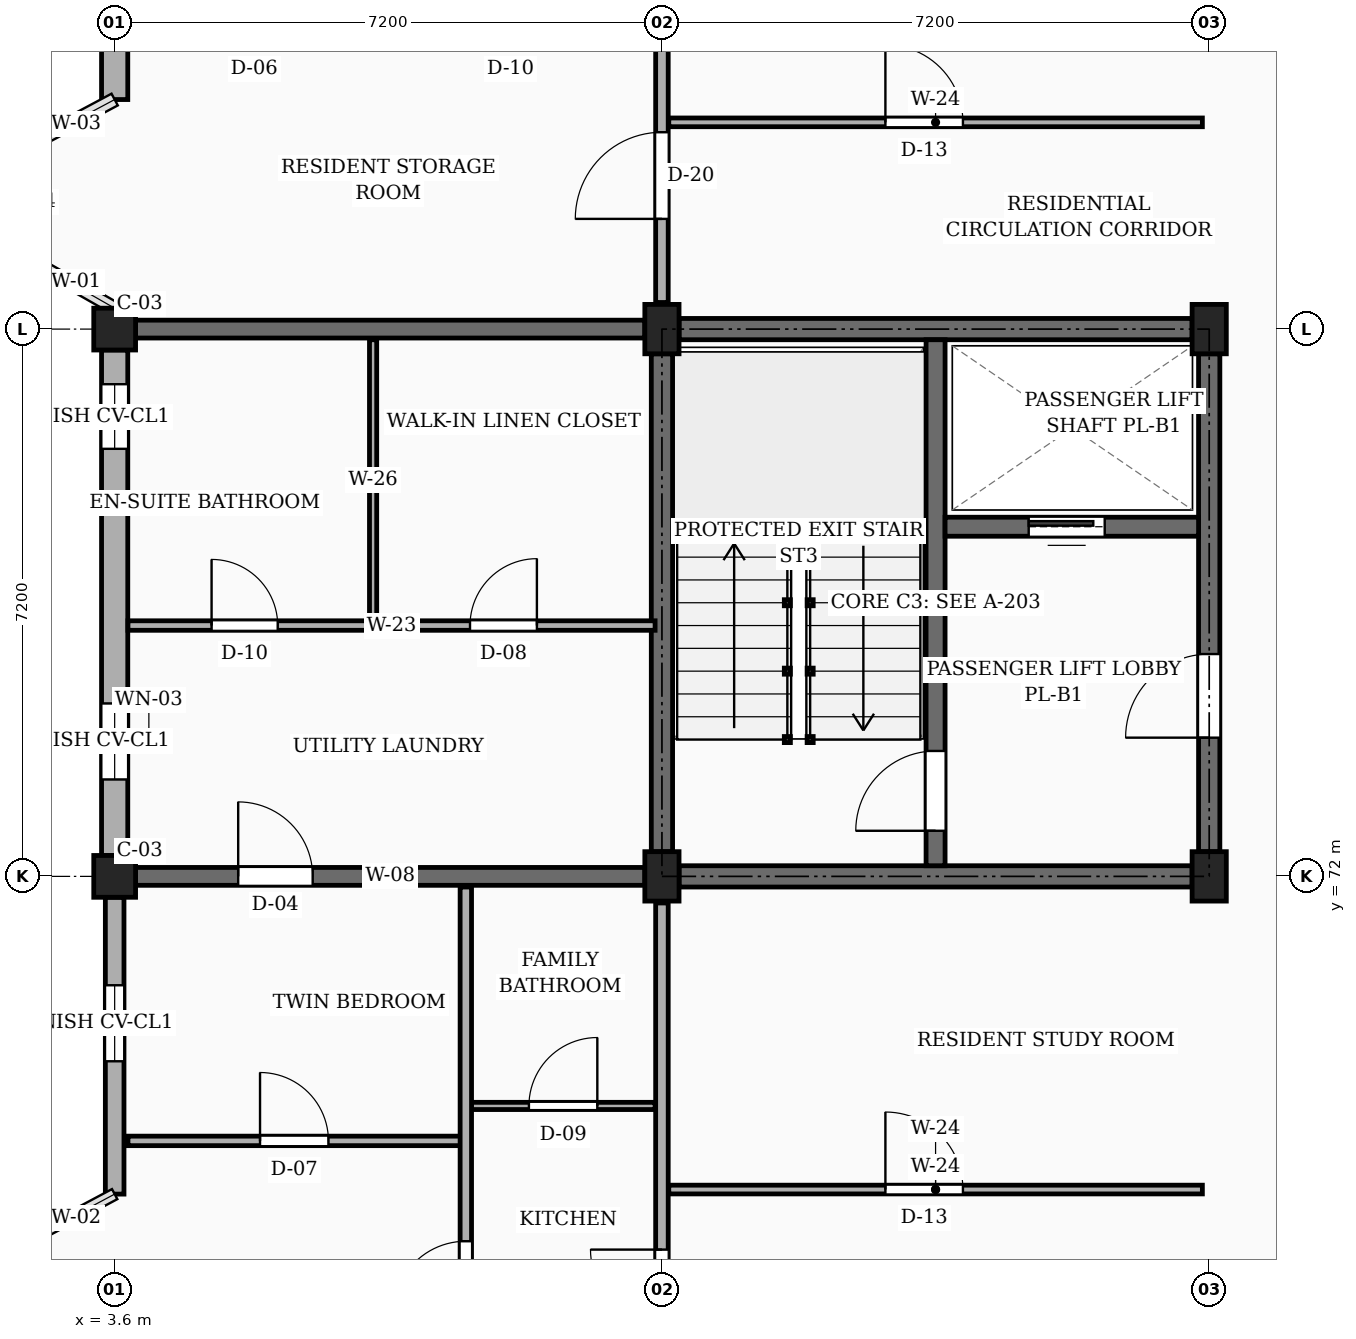
"""IFC4 building model, lengths in metres.
Left out: names, types, materials, properties, quantities, classifications, styles, units other than length and angle.
Written with IfcOpenShell. Run it as: python <this file> out.ifc"""

import sys

from ifc_helpers import new_model, si_unit, direction, frame, frame_2d, origin, origin_2d, place, context, subcontext, project, spatial, rectangle, extrude, element, fill, save


model = new_model("IFC4")
c1 = context("Model", 3, precision=1e-05, world=origin(), true_north=direction((0.0, 1.0)))
c2 = subcontext(c1, "Body", "Model", "MODEL_VIEW")
j1 = project(units=[si_unit("LENGTHUNIT", "METRE"), si_unit("PLANEANGLEUNIT", "RADIAN")], contexts=[c1])
p1 = place(None, origin())
s1 = spatial("IfcSite", under=j1, at=p1, CompositionType="ELEMENT")
p2 = place(p1, origin())
s2 = spatial("IfcBuilding", under=s1, at=p2, CompositionType="ELEMENT")
p3 = place(p2, frame((0.0, 0.0, 20.25)))
s3 = spatial("IfcBuildingStorey", under=s2, at=p3, CompositionType="ELEMENT", Elevation=20.25)
for number, where, z_axis, x_axis in (
    (1, (3.6, 72.0, 0.0), (0.0, 0.0, 1.0), (1.0, 0.0, 0.0)),
    (2, (3.6, 79.2, 0.0), (0.0, 0.0, 1.0), (1.0, 0.0, 0.0)),
):
    element("IfcColumn", number, at=place(p3, frame(where, z_axis=z_axis, x_axis=x_axis)), inside=s3, PredefinedType="COLUMN", context=c2, shape_type="SweptSolid", body=[
        extrude(rectangle(XDim=0.55, YDim=0.55, at=origin_2d()), origin(), (0.0, 0.0, 1.0), 3.15),
    ])
for number, where, z_axis, x_axis in (
    (3, (10.8, 72.0, 0.0), (0.0, 0.0, 1.0), (1.0, 0.0, 0.0)),
    (4, (10.8, 79.2, 0.0), (0.0, 0.0, 1.0), (1.0, 0.0, 0.0)),
    (5, (18.0, 72.0, 0.0), (0.0, 0.0, 1.0), (1.0, 0.0, 0.0)),
    (6, (18.0, 79.2, 0.0), (0.0, 0.0, 1.0), (1.0, 0.0, 0.0)),
):
    element("IfcColumn", number, at=place(p3, frame(where, z_axis=z_axis, x_axis=x_axis)), inside=s3, PredefinedType="COLUMN", context=c2, shape_type="SweptSolid", body=[
        extrude(rectangle(XDim=0.45, YDim=0.65, at=origin_2d()), origin(), (0.0, 0.0, 1.0), 3.15),
    ])
p4 = place(p3, frame((3.875, 72.0, 0.0), z_axis=(0.0, 0.0, 1.0), x_axis=(1.0, 0.0, 0.0)))
e7 = element("IfcWall", 7, at=p4, inside=s3, PredefinedType="SOLIDWALL", context=c2, shape_type="SweptSolid", body=[
    extrude(rectangle(XDim=6.7, YDim=0.235, at=frame_2d((3.35, 0.0))), origin(), (0.0, 0.0, 1.0), 2.21),
])
p5 = place(p4, frame((1.35, 0.0, 0.0)))
e8 = element("IfcOpeningElement", 8, at=p5, cuts=e7, PredefinedType="OPENING", context=c2, shape_type="SweptSolid", body=[
    extrude(rectangle(XDim=0.98, YDim=2.12, at=frame_2d((0.49, 1.06))), frame((0.0, 0.127, 0.0), z_axis=(0.0, -1.0, 0.0), x_axis=(1.0, 0.0, 0.0)), (0.0, 0.0, 1.0), 0.255),
])
p6 = place(p3, frame((3.875, 79.2, 0.0), z_axis=(0.0, 0.0, 1.0), x_axis=(1.0, 0.0, 0.0)))
e9 = element("IfcWall", 9, at=p6, inside=s3, PredefinedType="SOLIDWALL", context=c2, shape_type="SweptSolid", body=[
    extrude(rectangle(XDim=6.7, YDim=0.235, at=frame_2d((3.35, 0.0))), origin(), (0.0, 0.0, 1.0), 2.21),
])
p7 = place(p3, frame((3.6, 86.125, 0.0), z_axis=(0.0, 0.0, 1.0), x_axis=(0.0, -1.0, 0.0)))
e10 = element("IfcWall", 10, at=p7, inside=s3, PredefinedType="SOLIDWALL", context=c2, shape_type="SweptSolid", body=[
    extrude(rectangle(XDim=3.905, YDim=0.345, at=frame_2d((1.953, 0.0))), origin(), (0.0, 0.0, 1.0), 2.48),
])
p8 = place(p7, frame((0.893, 0.0, 0.78)))
e11 = element("IfcOpeningElement", 11, at=p8, cuts=e10, PredefinedType="OPENING", context=c2, shape_type="SweptSolid", body=[
    extrude(rectangle(XDim=1.45, YDim=1.44, at=frame_2d((0.725, 0.72))), frame((0.0, 0.183, 0.0), z_axis=(0.0, -1.0, 0.0), x_axis=(1.0, 0.0, 0.0)), (0.0, 0.0, 1.0), 0.365),
])
p9 = place(p3, frame((3.6, 78.925, 0.0), z_axis=(0.0, 0.0, 1.0), x_axis=(0.0, -1.0, 0.0)))
e12 = element("IfcWall", 12, at=p9, inside=s3, PredefinedType="SOLIDWALL", context=c2, shape_type="SweptSolid", body=[
    extrude(rectangle(XDim=6.65, YDim=0.345, at=frame_2d((3.325, 0.0))), origin(), (0.0, 0.0, 1.0), 2.48),
])
p10 = place(p9, frame((0.45, 0.0, 0.78)))
e13 = element("IfcOpeningElement", 13, at=p10, cuts=e12, PredefinedType="OPENING", context=c2, shape_type="SweptSolid", body=[
    extrude(rectangle(XDim=0.85, YDim=1.15, at=frame_2d((0.425, 0.575))), frame((0.0, 0.183, 0.0), z_axis=(0.0, -1.0, 0.0), x_axis=(1.0, 0.0, 0.0)), (0.0, 0.0, 1.0), 0.365),
])
p11 = place(p9, frame((4.65, 0.0, 0.78)))
e14 = element("IfcOpeningElement", 14, at=p11, cuts=e12, PredefinedType="OPENING", context=c2, shape_type="SweptSolid", body=[
    extrude(rectangle(XDim=1.0, YDim=1.15, at=frame_2d((0.5, 0.575))), frame((0.0, 0.183, 0.0), z_axis=(0.0, -1.0, 0.0), x_axis=(1.0, 0.0, 0.0)), (0.0, 0.0, 1.0), 0.365),
])
p12 = place(p3, frame((3.6, 71.725, 0.0), z_axis=(0.0, 0.0, 1.0), x_axis=(0.0, -1.0, 0.0)))
e15 = element("IfcWall", 15, at=p12, inside=s3, PredefinedType="SOLIDWALL", context=c2, shape_type="SweptSolid", body=[
    extrude(rectangle(XDim=3.905, YDim=0.245, at=frame_2d((1.953, 0.0))), origin(), (0.0, 0.0, 1.0), 2.48),
])
p13 = place(p12, frame((1.157, 0.0, 0.78)))
e16 = element("IfcOpeningElement", 16, at=p13, cuts=e15, PredefinedType="OPENING", context=c2, shape_type="SweptSolid", body=[
    extrude(rectangle(XDim=1.0, YDim=1.15, at=frame_2d((0.5, 0.575))), frame((0.0, 0.133, 0.0), z_axis=(0.0, -1.0, 0.0), x_axis=(1.0, 0.0, 0.0)), (0.0, 0.0, 1.0), 0.265),
])
p14 = place(p3, frame((10.8, 72.325, 0.0), z_axis=(0.0, 0.0, 1.0), x_axis=(0.0, 1.0, 0.0)))
e17 = element("IfcWall", 17, at=p14, inside=s3, PredefinedType="SHEAR", context=c2, shape_type="SweptSolid", body=[
    extrude(rectangle(XDim=6.55, YDim=0.28, at=frame_2d((3.275, 0.0))), origin(), (0.0, 0.0, 1.0), 2.91),
])
p15 = place(p3, frame((11.025, 79.2, 0.0), z_axis=(0.0, 0.0, 1.0), x_axis=(1.0, 0.0, 0.0)))
e18 = element("IfcWall", 18, at=p15, inside=s3, PredefinedType="SHEAR", context=c2, shape_type="SweptSolid", body=[
    extrude(rectangle(XDim=6.75, YDim=0.28, at=frame_2d((3.375, 0.0))), origin(), (0.0, 0.0, 1.0), 2.91),
])
p16 = place(p3, frame((18.0, 72.325, 0.0), z_axis=(0.0, 0.0, 1.0), x_axis=(0.0, 1.0, 0.0)))
e19 = element("IfcWall", 19, at=p16, inside=s3, PredefinedType="SHEAR", context=c2, shape_type="SweptSolid", body=[
    extrude(rectangle(XDim=6.55, YDim=0.28, at=frame_2d((3.275, 0.0))), origin(), (0.0, 0.0, 1.0), 2.91),
])
p17 = place(p16, frame((1.5, 0.0, 0.0)))
e20 = element("IfcOpeningElement", 20, at=p17, cuts=e19, PredefinedType="OPENING", context=c2, shape_type="SweptSolid", body=[
    extrude(rectangle(XDim=1.1, YDim=2.15, at=frame_2d((0.55, 1.075))), frame((0.0, 0.15, 0.0), z_axis=(0.0, -1.0, 0.0), x_axis=(1.0, 0.0, 0.0)), (0.0, 0.0, 1.0), 0.3),
])
p18 = place(p3, frame((11.025, 72.0, 0.0), z_axis=(0.0, 0.0, 1.0), x_axis=(1.0, 0.0, 0.0)))
e21 = element("IfcWall", 21, at=p18, inside=s3, PredefinedType="SHEAR", context=c2, shape_type="SweptSolid", body=[
    extrude(rectangle(XDim=6.75, YDim=0.28, at=frame_2d((3.375, 0.0))), origin(), (0.0, 0.0, 1.0), 2.91),
])
p19 = place(p3, frame((14.4, 72.14, 0.0), z_axis=(0.0, 0.0, 1.0), x_axis=(0.0, 1.0, 0.0)))
e22 = element("IfcWall", 22, at=p19, inside=s3, PredefinedType="SHEAR", context=c2, shape_type="SweptSolid", body=[
    extrude(rectangle(XDim=6.92, YDim=0.25, at=frame_2d((3.46, 0.0))), origin(), (0.0, 0.0, 1.0), 2.91),
])
p20 = place(p19, frame((0.46, 0.0, 0.0)))
e23 = element("IfcOpeningElement", 23, at=p20, cuts=e22, PredefinedType="OPENING", context=c2, shape_type="SweptSolid", body=[
    extrude(rectangle(XDim=1.05, YDim=2.15, at=frame_2d((0.525, 1.075))), frame((0.0, 0.135, 0.0), z_axis=(0.0, -1.0, 0.0), x_axis=(1.0, 0.0, 0.0)), (0.0, 0.0, 1.0), 0.27),
])
p21 = place(p3, frame((14.525, 76.6, 0.0), z_axis=(0.0, 0.0, 1.0), x_axis=(1.0, 0.0, 0.0)))
e24 = element("IfcWall", 24, at=p21, inside=s3, PredefinedType="SHEAR", context=c2, shape_type="SweptSolid", body=[
    extrude(rectangle(XDim=3.335, YDim=0.25, at=frame_2d((1.667, 0.0))), origin(), (0.0, 0.0, 1.0), 2.91),
])
p22 = place(p21, frame((1.1, 0.0, 0.0)))
e25 = element("IfcOpeningElement", 25, at=p22, cuts=e24, PredefinedType="OPENING", context=c2, shape_type="SweptSolid", body=[
    extrude(rectangle(XDim=1.0, YDim=2.2, at=frame_2d((0.5, 1.1))), frame((0.0, 0.135, 0.0), z_axis=(0.0, -1.0, 0.0), x_axis=(1.0, 0.0, 0.0)), (0.0, 0.0, 1.0), 0.27),
])
p23 = place(p3, frame((10.8, 65.15, 0.0), z_axis=(0.0, 0.0, 1.0), x_axis=(0.0, 1.0, 0.0)))
e26 = element("IfcWall", 26, at=p23, inside=s3, PredefinedType="PARTITIONING", context=c2, shape_type="SweptSolid", body=[
    extrude(rectangle(XDim=6.5, YDim=0.165, at=frame_2d((3.25, 0.0))), origin(), (0.0, 0.0, 1.0), 2.345),
])
p24 = place(p23, frame((1.0, 0.0, 0.0)))
e27 = element("IfcOpeningElement", 27, at=p24, cuts=e26, PredefinedType="OPENING", context=c2, shape_type="SweptSolid", body=[
    extrude(rectangle(XDim=0.94, YDim=2.12, at=frame_2d((0.47, 1.06))), frame((0.0, 0.093, 0.0), z_axis=(0.0, -1.0, 0.0), x_axis=(1.0, 0.0, 0.0)), (0.0, 0.0, 1.0), 0.185),
])
p25 = place(p3, frame((10.8, 79.55, 0.0), z_axis=(0.0, 0.0, 1.0), x_axis=(0.0, 1.0, 0.0)))
e28 = element("IfcWall", 28, at=p25, inside=s3, PredefinedType="PARTITIONING", context=c2, shape_type="SweptSolid", body=[
    extrude(rectangle(XDim=6.5, YDim=0.165, at=frame_2d((3.25, 0.0))), origin(), (0.0, 0.0, 1.0), 2.345),
])
p26 = place(p25, frame((1.1, 0.0, 0.0)))
e29 = element("IfcOpeningElement", 29, at=p26, cuts=e28, PredefinedType="OPENING", context=c2, shape_type="SweptSolid", body=[
    extrude(rectangle(XDim=1.14, YDim=2.18, at=frame_2d((0.57, 1.09))), frame((0.0, 0.093, 0.0), z_axis=(0.0, -1.0, 0.0), x_axis=(1.0, 0.0, 0.0)), (0.0, 0.0, 1.0), 0.185),
])
p27 = place(p3, frame((10.89, 67.88, 0.0), z_axis=(0.0, 0.0, 1.0), x_axis=(1.0, 0.0, 0.0)))
e30 = element("IfcWall", 30, at=p27, inside=s3, PredefinedType="PARTITIONING", context=c2, shape_type="SweptSolid", body=[
    extrude(rectangle(XDim=7.02, YDim=0.115, at=frame_2d((3.51, 0.0))), origin(), (0.0, 0.0, 1.0), 2.345),
])
p28 = place(p27, frame((2.85, 0.0, 0.0)))
e31 = element("IfcOpeningElement", 31, at=p28, cuts=e30, PredefinedType="OPENING", context=c2, shape_type="SweptSolid", body=[
    extrude(rectangle(XDim=1.02, YDim=2.15, at=frame_2d((0.51, 1.075))), frame((0.0, 0.067, 0.0), z_axis=(0.0, -1.0, 0.0), x_axis=(1.0, 0.0, 0.0)), (0.0, 0.0, 1.0), 0.135),
])
p29 = place(p3, frame((3.775, 68.52, 0.0), z_axis=(0.0, 0.0, 1.0), x_axis=(1.0, 0.0, 0.0)))
e32 = element("IfcWall", 32, at=p29, inside=s3, PredefinedType="PARTITIONING", context=c2, shape_type="SweptSolid", body=[
    extrude(rectangle(XDim=4.375, YDim=0.125, at=frame_2d((2.188, 0.0))), origin(), (0.0, 0.0, 1.0), 2.345),
])
p30 = place(p29, frame((1.738, 0.0, 0.0)))
e33 = element("IfcOpeningElement", 33, at=p30, cuts=e32, PredefinedType="OPENING", context=c2, shape_type="SweptSolid", body=[
    extrude(rectangle(XDim=0.9, YDim=2.1, at=frame_2d((0.45, 1.05))), frame((0.0, 0.073, 0.0), z_axis=(0.0, -1.0, 0.0), x_axis=(1.0, 0.0, 0.0)), (0.0, 0.0, 1.0), 0.145),
])
p31 = place(p3, frame((8.29, 68.98, 0.0), z_axis=(0.0, 0.0, 1.0), x_axis=(1.0, 0.0, 0.0)))
e34 = element("IfcWall", 34, at=p31, inside=s3, PredefinedType="PARTITIONING", context=c2, shape_type="SweptSolid", body=[
    extrude(rectangle(XDim=2.42, YDim=0.095, at=frame_2d((1.21, 0.0))), origin(), (0.0, 0.0, 1.0), 2.345),
])
p32 = place(p31, frame((0.76, 0.0, 0.0)))
e35 = element("IfcOpeningElement", 35, at=p32, cuts=e34, PredefinedType="OPENING", context=c2, shape_type="SweptSolid", body=[
    extrude(rectangle(XDim=0.9, YDim=2.05, at=frame_2d((0.45, 1.025))), frame((0.0, 0.058, 0.0), z_axis=(0.0, -1.0, 0.0), x_axis=(1.0, 0.0, 0.0)), (0.0, 0.0, 1.0), 0.115),
])
p33 = place(p3, frame((8.22, 64.975, 0.0), z_axis=(0.0, 0.0, 1.0), x_axis=(0.0, 1.0, 0.0)))
e36 = element("IfcWall", 36, at=p33, inside=s3, PredefinedType="PARTITIONING", context=c2, shape_type="SweptSolid", body=[
    extrude(rectangle(XDim=6.885, YDim=0.15, at=frame_2d((3.442, 0.0))), origin(), (0.0, 0.0, 1.0), 2.345),
])
p34 = place(p33, frame((1.275, 0.0, 0.0)))
e37 = element("IfcOpeningElement", 37, at=p34, cuts=e36, PredefinedType="OPENING", context=c2, shape_type="SweptSolid", body=[
    extrude(rectangle(XDim=0.95, YDim=2.1, at=frame_2d((0.475, 1.05))), frame((0.0, 0.085, 0.0), z_axis=(0.0, -1.0, 0.0), x_axis=(1.0, 0.0, 0.0)), (0.0, 0.0, 1.0), 0.17),
])
p35 = place(p3, frame((3.775, 75.3, 0.0), z_axis=(0.0, 0.0, 1.0), x_axis=(1.0, 0.0, 0.0)))
e38 = element("IfcWall", 38, at=p35, inside=s3, PredefinedType="PARTITIONING", context=c2, shape_type="SweptSolid", body=[
    extrude(rectangle(XDim=6.935, YDim=0.125, at=frame_2d((3.468, 0.0))), origin(), (0.0, 0.0, 1.0), 2.345),
])
p36 = place(p35, frame((1.1, 0.0, 0.0)))
e39 = element("IfcOpeningElement", 39, at=p36, cuts=e38, PredefinedType="OPENING", context=c2, shape_type="SweptSolid", body=[
    extrude(rectangle(XDim=0.87, YDim=2.05, at=frame_2d((0.435, 1.025))), frame((0.0, 0.073, 0.0), z_axis=(0.0, -1.0, 0.0), x_axis=(1.0, 0.0, 0.0)), (0.0, 0.0, 1.0), 0.145),
])
p37 = place(p35, frame((4.5, 0.0, 0.0)))
e40 = element("IfcOpeningElement", 40, at=p37, cuts=e38, PredefinedType="OPENING", context=c2, shape_type="SweptSolid", body=[
    extrude(rectangle(XDim=0.88, YDim=2.08, at=frame_2d((0.44, 1.04))), frame((0.0, 0.073, 0.0), z_axis=(0.0, -1.0, 0.0), x_axis=(1.0, 0.0, 0.0)), (0.0, 0.0, 1.0), 0.145),
])
p38 = place(p3, frame((7.0, 75.37, 0.0), z_axis=(0.0, 0.0, 1.0), x_axis=(0.0, 1.0, 0.0)))
e41 = element("IfcWall", 41, at=p38, inside=s3, PredefinedType="PARTITIONING", context=c2, shape_type="SweptSolid", body=[
    extrude(rectangle(XDim=3.69, YDim=0.095, at=frame_2d((1.845, 0.0))), origin(), (0.0, 0.0, 1.0), 2.345),
])
p39 = place(p3, frame((10.89, 81.92, 0.0), z_axis=(0.0, 0.0, 1.0), x_axis=(1.0, 0.0, 0.0)))
e42 = element("IfcWall", 42, at=p39, inside=s3, PredefinedType="PARTITIONING", context=c2, shape_type="SweptSolid", body=[
    extrude(rectangle(XDim=7.02, YDim=0.115, at=frame_2d((3.51, 0.0))), origin(), (0.0, 0.0, 1.0), 2.345),
])
p40 = place(p39, frame((2.85, 0.0, 0.0)))
e43 = element("IfcOpeningElement", 43, at=p40, cuts=e42, PredefinedType="OPENING", context=c2, shape_type="SweptSolid", body=[
    extrude(rectangle(XDim=1.02, YDim=2.15, at=frame_2d((0.51, 1.075))), frame((0.0, 0.067, 0.0), z_axis=(0.0, -1.0, 0.0), x_axis=(1.0, 0.0, 0.0)), (0.0, 0.0, 1.0), 0.135),
])
p41 = place(p10, origin())
e44 = element("IfcWindow", 44, at=p41, inside=s3, PartitioningType="SINGLE_PANEL", PredefinedType="WINDOW", context=c2, shape_type="SweptSolid", body=[
    extrude(rectangle(XDim=0.85, YDim=1.15, at=frame_2d((0.425, 0.575))), frame((0.0, 0.03, 0.0), z_axis=(0.0, -1.0, 0.0), x_axis=(1.0, 0.0, 0.0)), (0.0, 0.0, 1.0), 0.06),
])
fill(e13, e44)
p42 = place(p11, origin())
e45 = element("IfcWindow", 45, at=p42, inside=s3, PartitioningType="SINGLE_PANEL", PredefinedType="WINDOW", context=c2, shape_type="SweptSolid", body=[
    extrude(rectangle(XDim=1.0, YDim=1.15, at=frame_2d((0.5, 0.575))), frame((0.0, 0.03, 0.0), z_axis=(0.0, -1.0, 0.0), x_axis=(1.0, 0.0, 0.0)), (0.0, 0.0, 1.0), 0.06),
])
fill(e14, e45)
p43 = place(p13, origin())
e46 = element("IfcWindow", 46, at=p43, inside=s3, PartitioningType="SINGLE_PANEL", PredefinedType="WINDOW", context=c2, shape_type="SweptSolid", body=[
    extrude(rectangle(XDim=1.0, YDim=1.15, at=frame_2d((0.5, 0.575))), frame((0.0, 0.03, 0.0), z_axis=(0.0, -1.0, 0.0), x_axis=(1.0, 0.0, 0.0)), (0.0, 0.0, 1.0), 0.06),
])
fill(e16, e46)
p44 = place(p17, frame((1.1, 0.0, 0.0), z_axis=(0.0, 0.0, 1.0), x_axis=(-1.0, 0.0, 0.0)))
e47 = element("IfcDoor", 47, at=p44, inside=s3, OperationType="SINGLE_SWING_LEFT", PredefinedType="DOOR", context=c2, shape_type="SweptSolid", body=[
    extrude(rectangle(XDim=1.1, YDim=2.15, at=frame_2d((0.55, 1.075))), frame((0.0, 0.025, 0.0), z_axis=(0.0, -1.0, 0.0), x_axis=(1.0, 0.0, 0.0)), (0.0, 0.0, 1.0), 0.05),
])
fill(e20, e47)
p45 = place(p20, origin())
e48 = element("IfcDoor", 48, at=p45, inside=s3, OperationType="SINGLE_SWING_LEFT", PredefinedType="DOOR", context=c2, shape_type="SweptSolid", body=[
    extrude(rectangle(XDim=1.05, YDim=2.15, at=frame_2d((0.525, 1.075))), frame((0.0, 0.025, 0.0), z_axis=(0.0, -1.0, 0.0), x_axis=(1.0, 0.0, 0.0)), (0.0, 0.0, 1.0), 0.05),
])
fill(e23, e48)
p46 = place(p22, origin())
e49 = element("IfcDoor", 49, at=p46, inside=s3, OperationType="SLIDING_TO_LEFT", PredefinedType="DOOR", context=c2, shape_type="SweptSolid", body=[
    extrude(rectangle(XDim=1.0, YDim=2.2, at=frame_2d((0.5, 1.1))), frame((0.0, 0.025, 0.0), z_axis=(0.0, -1.0, 0.0), x_axis=(1.0, 0.0, 0.0)), (0.0, 0.0, 1.0), 0.05),
])
fill(e25, e49)
p47 = place(p24, origin())
e50 = element("IfcDoor", 50, at=p47, inside=s3, OperationType="SINGLE_SWING_RIGHT", PredefinedType="DOOR", context=c2, shape_type="SweptSolid", body=[
    extrude(rectangle(XDim=0.94, YDim=2.12, at=frame_2d((0.47, 1.06))), frame((0.0, 0.025, 0.0), z_axis=(0.0, -1.0, 0.0), x_axis=(1.0, 0.0, 0.0)), (0.0, 0.0, 1.0), 0.05),
])
fill(e27, e50)
p48 = place(p26, origin())
e51 = element("IfcDoor", 51, at=p48, inside=s3, OperationType="SINGLE_SWING_LEFT", PredefinedType="DOOR", context=c2, shape_type="SweptSolid", body=[
    extrude(rectangle(XDim=1.14, YDim=2.18, at=frame_2d((0.57, 1.09))), frame((0.0, 0.025, 0.0), z_axis=(0.0, -1.0, 0.0), x_axis=(1.0, 0.0, 0.0)), (0.0, 0.0, 1.0), 0.05),
])
fill(e29, e51)
p49 = place(p28, origin())
e52 = element("IfcDoor", 52, at=p49, inside=s3, OperationType="SINGLE_SWING_LEFT", PredefinedType="DOOR", context=c2, shape_type="SweptSolid", body=[
    extrude(rectangle(XDim=1.02, YDim=2.15, at=frame_2d((0.51, 1.075))), frame((0.0, 0.025, 0.0), z_axis=(0.0, -1.0, 0.0), x_axis=(1.0, 0.0, 0.0)), (0.0, 0.0, 1.0), 0.05),
])
fill(e31, e52)
p50 = place(p30, origin())
e53 = element("IfcDoor", 53, at=p50, inside=s3, OperationType="SINGLE_SWING_LEFT", PredefinedType="DOOR", context=c2, shape_type="SweptSolid", body=[
    extrude(rectangle(XDim=0.9, YDim=2.1, at=frame_2d((0.45, 1.05))), frame((0.0, 0.025, 0.0), z_axis=(0.0, -1.0, 0.0), x_axis=(1.0, 0.0, 0.0)), (0.0, 0.0, 1.0), 0.05),
])
fill(e33, e53)
p51 = place(p32, origin())
e54 = element("IfcDoor", 54, at=p51, inside=s3, OperationType="SINGLE_SWING_RIGHT", PredefinedType="DOOR", context=c2, shape_type="SweptSolid", body=[
    extrude(rectangle(XDim=0.9, YDim=2.05, at=frame_2d((0.45, 1.025))), frame((0.0, 0.025, 0.0), z_axis=(0.0, -1.0, 0.0), x_axis=(1.0, 0.0, 0.0)), (0.0, 0.0, 1.0), 0.05),
])
fill(e35, e54)
p52 = place(p34, origin())
e55 = element("IfcDoor", 55, at=p52, inside=s3, OperationType="SINGLE_SWING_LEFT", PredefinedType="DOOR", context=c2, shape_type="SweptSolid", body=[
    extrude(rectangle(XDim=0.95, YDim=2.1, at=frame_2d((0.475, 1.05))), frame((0.0, 0.025, 0.0), z_axis=(0.0, -1.0, 0.0), x_axis=(1.0, 0.0, 0.0)), (0.0, 0.0, 1.0), 0.05),
])
fill(e37, e55)
p53 = place(p36, origin())
e56 = element("IfcDoor", 56, at=p53, inside=s3, OperationType="SINGLE_SWING_LEFT", PredefinedType="DOOR", context=c2, shape_type="SweptSolid", body=[
    extrude(rectangle(XDim=0.87, YDim=2.05, at=frame_2d((0.435, 1.025))), frame((0.0, 0.025, 0.0), z_axis=(0.0, -1.0, 0.0), x_axis=(1.0, 0.0, 0.0)), (0.0, 0.0, 1.0), 0.05),
])
fill(e39, e56)
p54 = place(p37, origin())
e57 = element("IfcDoor", 57, at=p54, inside=s3, OperationType="SINGLE_SWING_RIGHT", PredefinedType="DOOR", context=c2, shape_type="SweptSolid", body=[
    extrude(rectangle(XDim=0.88, YDim=2.08, at=frame_2d((0.44, 1.04))), frame((0.0, 0.025, 0.0), z_axis=(0.0, -1.0, 0.0), x_axis=(1.0, 0.0, 0.0)), (0.0, 0.0, 1.0), 0.05),
])
fill(e40, e57)
p55 = place(p40, origin())
e58 = element("IfcDoor", 58, at=p55, inside=s3, OperationType="SINGLE_SWING_LEFT", PredefinedType="DOOR", context=c2, shape_type="SweptSolid", body=[
    extrude(rectangle(XDim=1.02, YDim=2.15, at=frame_2d((0.51, 1.075))), frame((0.0, 0.025, 0.0), z_axis=(0.0, -1.0, 0.0), x_axis=(1.0, 0.0, 0.0)), (0.0, 0.0, 1.0), 0.05),
])
fill(e43, e58)
p56 = place(p5, origin())
e59 = element("IfcDoor", 59, at=p56, inside=s3, OperationType="SINGLE_SWING_LEFT", PredefinedType="DOOR", context=c2, shape_type="SweptSolid", body=[
    extrude(rectangle(XDim=0.98, YDim=2.12, at=frame_2d((0.49, 1.06))), frame((0.0, 0.025, 0.0), z_axis=(0.0, -1.0, 0.0), x_axis=(1.0, 0.0, 0.0)), (0.0, 0.0, 1.0), 0.05),
])
fill(e8, e59)
save(model, sys.argv[1])
